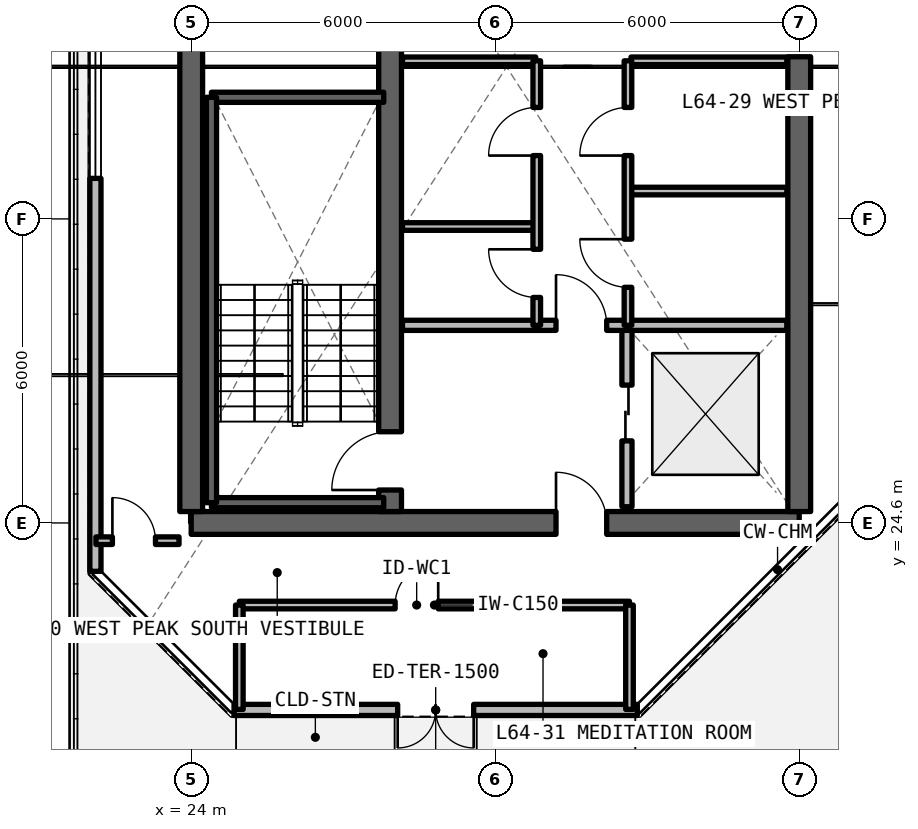
"""IFC4 building model, lengths in metres.
Left out: names, types, materials, properties, quantities, classifications, styles, units other than length and angle.
Written with IfcOpenShell. Run it as: python <this file> out.ifc"""

import sys

from ifc_helpers import new_model, si_unit, direction, frame, frame_2d, origin, place, context, subcontext, project, spatial, rectangle, extrude, element, fill, save


model = new_model("IFC4")
c1 = context("Model", 3, precision=1e-05, world=origin(), true_north=direction((0.0, 1.0)))
c2 = subcontext(c1, "Body", "Model", "MODEL_VIEW")
j1 = project(units=[si_unit("LENGTHUNIT", "METRE"), si_unit("PLANEANGLEUNIT", "RADIAN")], contexts=[c1])
p1 = place(None, origin())
s1 = spatial("IfcSite", under=j1, at=p1, CompositionType="ELEMENT")
p2 = place(p1, origin())
s2 = spatial("IfcBuilding", under=s1, at=p2, CompositionType="ELEMENT")
p3 = place(p2, frame((0.0, 0.0, 229.35)))
s3 = spatial("IfcBuildingStorey", under=s2, at=p3, CompositionType="ELEMENT", Elevation=229.35)
p4 = place(p3, frame((24.0, 24.6, 0.0), z_axis=(0.0, 0.0, 1.0), x_axis=(1.0, 0.0, 0.0)))
e1 = element("IfcWall", 1, at=p4, inside=s3, PredefinedType="SHEAR", context=c2, shape_type="SweptSolid", body=[
    extrude(rectangle(XDim=12.0, YDim=0.45, at=frame_2d((6.0, 0.0))), origin(), (0.0, 0.0, 1.0), 3.3),
])
p5 = place(p4, frame((7.2, 0.0, 0.0)))
e2 = element("IfcOpeningElement", 2, at=p5, cuts=e1, PredefinedType="OPENING", context=c2, shape_type="SweptSolid", body=[
    extrude(rectangle(XDim=1.0, YDim=2.15, at=frame_2d((0.5, 1.075))), frame((0.0, 0.235, 0.0), z_axis=(0.0, -1.0, 0.0), x_axis=(1.0, 0.0, 0.0)), (0.0, 0.0, 1.0), 0.47),
])
p6 = place(p3, frame((24.0, 24.825, 0.0), z_axis=(0.0, 0.0, 1.0), x_axis=(0.0, 1.0, 0.0)))
e3 = element("IfcWall", 3, at=p6, inside=s3, PredefinedType="SHEAR", context=c2, shape_type="SweptSolid", body=[
    extrude(rectangle(XDim=17.55, YDim=0.45, at=frame_2d((8.775, 0.0))), origin(), (0.0, 0.0, 1.0), 3.3),
])
p7 = place(p3, frame((36.0, 24.825, 0.0), z_axis=(0.0, 0.0, 1.0), x_axis=(0.0, 1.0, 0.0)))
e4 = element("IfcWall", 4, at=p7, inside=s3, PredefinedType="SHEAR", context=c2, shape_type="SweptSolid", body=[
    extrude(rectangle(XDim=8.975, YDim=0.45, at=frame_2d((4.488, 0.0))), origin(), (0.0, 0.0, 1.0), 3.3),
])
p8 = place(p3, frame((27.925, 24.825, 0.0), z_axis=(0.0, 0.0, 1.0), x_axis=(0.0, 1.0, 0.0)))
e5 = element("IfcWall", 5, at=p8, inside=s3, PredefinedType="SHEAR", context=c2, shape_type="SweptSolid", body=[
    extrude(rectangle(XDim=17.55, YDim=0.45, at=frame_2d((8.775, 0.0))), origin(), (0.0, 0.0, 1.0), 3.3),
])
p9 = place(p8, frame((0.425, 0.0, 0.0)))
e6 = element("IfcOpeningElement", 6, at=p9, cuts=e5, PredefinedType="OPENING", context=c2, shape_type="SweptSolid", body=[
    extrude(rectangle(XDim=1.15, YDim=2.15, at=frame_2d((0.575, 1.075))), frame((0.0, 0.235, 0.0), z_axis=(0.0, -1.0, 0.0), x_axis=(1.0, 0.0, 0.0)), (0.0, 0.0, 1.0), 0.47),
])
p10 = place(p8, frame((9.625, 0.0, 0.0)))
e7 = element("IfcOpeningElement", 7, at=p10, cuts=e5, PredefinedType="OPENING", context=c2, shape_type="SweptSolid", body=[
    extrude(rectangle(XDim=1.15, YDim=2.15, at=frame_2d((0.575, 1.075))), frame((0.0, 0.235, 0.0), z_axis=(0.0, -1.0, 0.0), x_axis=(1.0, 0.0, 0.0)), (0.0, 0.0, 1.0), 0.47),
])
p11 = place(p3, frame((24.846, 20.91, 0.0), z_axis=(0.0, 0.0, 1.0), x_axis=(1.0, 0.0, 0.0)))
e8 = element("IfcWall", 8, at=p11, inside=s3, PredefinedType="SOLIDWALL", context=c2, shape_type="SweptSolid", body=[
    extrude(rectangle(XDim=7.959, YDim=0.22, at=frame_2d((3.979, 0.0))), origin(), (0.0, 0.0, 1.0), 3.08),
])
p12 = place(p11, frame((3.229, 0.0, 0.0)))
e9 = element("IfcOpeningElement", 9, at=p12, cuts=e8, PredefinedType="OPENING", context=c2, shape_type="SweptSolid", body=[
    extrude(rectangle(XDim=1.5, YDim=2.2, at=frame_2d((0.75, 1.1))), frame((0.0, 0.12, 0.0), z_axis=(0.0, -1.0, 0.0), x_axis=(1.0, 0.0, 0.0)), (0.0, 0.0, 1.0), 0.24),
])
p13 = place(p3, frame((22.11, 43.554, 0.0), z_axis=(0.0, 0.0, 1.0), x_axis=(0.0, -1.0, 0.0)))
e10 = element("IfcWall", 10, at=p13, inside=s3, PredefinedType="SOLIDWALL", context=c2, shape_type="SweptSolid", body=[
    extrude(rectangle(XDim=19.909, YDim=0.22, at=frame_2d((9.955, 0.0))), origin(), (0.0, 0.0, 1.0), 3.08),
])
p14 = place(p13, frame((7.754, 0.0, 0.78)))
e11 = element("IfcOpeningElement", 11, at=p14, cuts=e10, PredefinedType="OPENING", context=c2, shape_type="SweptSolid", body=[
    extrude(rectangle(XDim=4.4, YDim=1.66, at=frame_2d((2.2, 0.83))), frame((0.0, 0.12, 0.0), z_axis=(0.0, -1.0, 0.0), x_axis=(1.0, 0.0, 0.0)), (0.0, 0.0, 1.0), 0.24),
])
p15 = place(p3, frame((32.6, 24.92, 0.0), z_axis=(0.0, 0.0, 1.0), x_axis=(0.0, 1.0, 0.0)))
e12 = element("IfcWall", 12, at=p15, inside=s3, PredefinedType="SOLIDWALL", context=c2, shape_type="SweptSolid", body=[
    extrude(rectangle(XDim=3.58, YDim=0.2, at=frame_2d((1.79, 0.0))), origin(), (0.0, 0.0, 1.0), 2.35),
])
p16 = place(p15, frame((1.3, 0.0, 0.0)))
e13 = element("IfcOpeningElement", 13, at=p16, cuts=e12, PredefinedType="OPENING", context=c2, shape_type="SweptSolid", body=[
    extrude(rectangle(XDim=1.1, YDim=2.2, at=frame_2d((0.55, 1.1))), frame((0.0, 0.11, 0.0), z_axis=(0.0, -1.0, 0.0), x_axis=(1.0, 0.0, 0.0)), (0.0, 0.0, 1.0), 0.22),
])
p17 = place(p3, frame((28.17, 28.5, 0.0), z_axis=(0.0, 0.0, 1.0), x_axis=(1.0, 0.0, 0.0)))
e14 = element("IfcWall", 14, at=p17, inside=s3, PredefinedType="SOLIDWALL", context=c2, shape_type="SweptSolid", body=[
    extrude(rectangle(XDim=7.585, YDim=0.2, at=frame_2d((3.792, 0.0))), origin(), (0.0, 0.0, 1.0), 2.35),
])
p18 = place(p17, frame((3.03, 0.0, 0.0)))
e15 = element("IfcOpeningElement", 15, at=p18, cuts=e14, PredefinedType="OPENING", context=c2, shape_type="SweptSolid", body=[
    extrude(rectangle(XDim=1.0, YDim=2.15, at=frame_2d((0.5, 1.075))), frame((0.0, 0.11, 0.0), z_axis=(0.0, -1.0, 0.0), x_axis=(1.0, 0.0, 0.0)), (0.0, 0.0, 1.0), 0.22),
])
for number, where, z_axis, x_axis in (
    (16, (28.17, 30.45, 0.0), (0.0, 0.0, 1.0), (1.0, 0.0, 0.0)),
    (17, (28.17, 33.72, 0.0), (0.0, 0.0, 1.0), (1.0, 0.0, 0.0)),
):
    element("IfcWall", number, at=place(p3, frame(where, z_axis=z_axis, x_axis=x_axis)), inside=s3, PredefinedType="SOLIDWALL", context=c2, shape_type="SweptSolid", body=[
        extrude(rectangle(XDim=2.63, YDim=0.15, at=frame_2d((1.315, 0.0))), origin(), (0.0, 0.0, 1.0), 2.35),
    ])
p19 = place(p3, frame((30.82, 28.5, 0.0), z_axis=(0.0, 0.0, 1.0), x_axis=(0.0, 1.0, 0.0)))
e18 = element("IfcWall", 18, at=p19, inside=s3, PredefinedType="SOLIDWALL", context=c2, shape_type="SweptSolid", body=[
    extrude(rectangle(XDim=5.22, YDim=0.15, at=frame_2d((2.61, 0.0))), origin(), (0.0, 0.0, 1.0), 2.35),
])
p20 = place(p19, frame((0.55, 0.0, 0.0)))
e19 = element("IfcOpeningElement", 19, at=p20, cuts=e18, PredefinedType="OPENING", context=c2, shape_type="SweptSolid", body=[
    extrude(rectangle(XDim=0.95, YDim=2.15, at=frame_2d((0.475, 1.075))), frame((0.0, 0.085, 0.0), z_axis=(0.0, -1.0, 0.0), x_axis=(1.0, 0.0, 0.0)), (0.0, 0.0, 1.0), 0.17),
])
p21 = place(p19, frame((3.35, 0.0, 0.0)))
e20 = element("IfcOpeningElement", 20, at=p21, cuts=e18, PredefinedType="OPENING", context=c2, shape_type="SweptSolid", body=[
    extrude(rectangle(XDim=0.95, YDim=2.15, at=frame_2d((0.475, 1.075))), frame((0.0, 0.085, 0.0), z_axis=(0.0, -1.0, 0.0), x_axis=(1.0, 0.0, 0.0)), (0.0, 0.0, 1.0), 0.17),
])
for number, where, z_axis, x_axis in (
    (21, (32.68, 31.15, 0.0), (0.0, 0.0, 1.0), (1.0, 0.0, 0.0)),
    (22, (32.68, 33.72, 0.0), (0.0, 0.0, 1.0), (1.0, 0.0, 0.0)),
):
    element("IfcWall", number, at=place(p3, frame(where, z_axis=z_axis, x_axis=x_axis)), inside=s3, PredefinedType="SOLIDWALL", context=c2, shape_type="SweptSolid", body=[
        extrude(rectangle(XDim=3.075, YDim=0.15, at=frame_2d((1.538, 0.0))), origin(), (0.0, 0.0, 1.0), 2.35),
    ])
p22 = place(p3, frame((32.62, 28.5, 0.0), z_axis=(0.0, 0.0, 1.0), x_axis=(0.0, 1.0, 0.0)))
e23 = element("IfcWall", 23, at=p22, inside=s3, PredefinedType="SOLIDWALL", context=c2, shape_type="SweptSolid", body=[
    extrude(rectangle(XDim=5.22, YDim=0.15, at=frame_2d((2.61, 0.0))), origin(), (0.0, 0.0, 1.0), 2.35),
])
p23 = place(p22, frame((0.75, 0.0, 0.0)))
e24 = element("IfcOpeningElement", 24, at=p23, cuts=e23, PredefinedType="OPENING", context=c2, shape_type="SweptSolid", body=[
    extrude(rectangle(XDim=0.95, YDim=2.15, at=frame_2d((0.475, 1.075))), frame((0.0, 0.085, 0.0), z_axis=(0.0, -1.0, 0.0), x_axis=(1.0, 0.0, 0.0)), (0.0, 0.0, 1.0), 0.17),
])
p24 = place(p22, frame((3.35, 0.0, 0.0)))
e25 = element("IfcOpeningElement", 25, at=p24, cuts=e23, PredefinedType="OPENING", context=c2, shape_type="SweptSolid", body=[
    extrude(rectangle(XDim=0.95, YDim=2.15, at=frame_2d((0.475, 1.075))), frame((0.0, 0.085, 0.0), z_axis=(0.0, -1.0, 0.0), x_axis=(1.0, 0.0, 0.0)), (0.0, 0.0, 1.0), 0.17),
])
p25 = place(p3, frame((24.95, 22.98, 0.0), z_axis=(0.0, 0.0, 1.0), x_axis=(1.0, 0.0, 0.0)))
e26 = element("IfcWall", 26, at=p25, inside=s3, PredefinedType="SOLIDWALL", context=c2, shape_type="SweptSolid", body=[
    extrude(rectangle(XDim=7.7, YDim=0.15, at=frame_2d((3.85, 0.0))), origin(), (0.0, 0.0, 1.0), 2.35),
])
p26 = place(p25, frame((3.075, 0.0, 0.0)))
e27 = element("IfcOpeningElement", 27, at=p26, cuts=e26, PredefinedType="OPENING", context=c2, shape_type="SweptSolid", body=[
    extrude(rectangle(XDim=0.85, YDim=2.1, at=frame_2d((0.425, 1.05))), frame((0.0, 0.085, 0.0), z_axis=(0.0, -1.0, 0.0), x_axis=(1.0, 0.0, 0.0)), (0.0, 0.0, 1.0), 0.17),
])
for number, where, z_axis, x_axis in (
    (28, (24.95, 20.92, 0.0), (0.0, 0.0, 1.0), (0.0, 1.0, 0.0)),
    (29, (32.65, 20.92, 0.0), (0.0, 0.0, 1.0), (0.0, 1.0, 0.0)),
):
    element("IfcWall", number, at=place(p3, frame(where, z_axis=z_axis, x_axis=x_axis)), inside=s3, PredefinedType="SOLIDWALL", context=c2, shape_type="SweptSolid", body=[
        extrude(rectangle(XDim=2.06, YDim=0.15, at=frame_2d((1.03, 0.0))), origin(), (0.0, 0.0, 1.0), 2.35),
    ])
p27 = place(p3, frame((22.12, 24.25, 0.0), z_axis=(0.0, 0.0, 1.0), x_axis=(1.0, 0.0, 0.0)))
e30 = element("IfcWall", 30, at=p27, inside=s3, PredefinedType="SOLIDWALL", context=c2, shape_type="SweptSolid", body=[
    extrude(rectangle(XDim=1.64, YDim=0.15, at=frame_2d((0.82, 0.0))), origin(), (0.0, 0.0, 1.0), 2.35),
])
p28 = place(p27, frame((0.325, 0.0, 0.0)))
e31 = element("IfcOpeningElement", 31, at=p28, cuts=e30, PredefinedType="OPENING", context=c2, shape_type="SweptSolid", body=[
    extrude(rectangle(XDim=0.85, YDim=2.1, at=frame_2d((0.425, 1.05))), frame((0.0, 0.085, 0.0), z_axis=(0.0, -1.0, 0.0), x_axis=(1.0, 0.0, 0.0)), (0.0, 0.0, 1.0), 0.17),
])
for number, where, z_axis, x_axis in (
    (32, (24.4, 25.0, 0.0), (0.0, 0.0, 1.0), (1.0, 0.0, 0.0)),
    (33, (27.8, 33.0, 0.0), (0.0, 0.0, 1.0), (-1.0, 0.0, 0.0)),
):
    element("IfcWall", number, at=place(p3, frame(where, z_axis=z_axis, x_axis=x_axis)), inside=s3, PredefinedType="SOLIDWALL", context=c2, shape_type="SweptSolid", body=[
        extrude(rectangle(XDim=3.4, YDim=0.2, at=frame_2d((1.7, 0.0))), origin(), (0.0, 0.0, 1.0), 3.3),
    ])
p29 = place(p3, frame((24.4, 33.0, 0.0), z_axis=(0.0, 0.0, 1.0), x_axis=(0.0, -1.0, 0.0)))
e34 = element("IfcWall", 34, at=p29, inside=s3, PredefinedType="SOLIDWALL", context=c2, shape_type="SweptSolid", body=[
    extrude(rectangle(XDim=8.0, YDim=0.2, at=frame_2d((4.0, 0.0))), origin(), (0.0, 0.0, 1.0), 3.3),
])
p30 = place(p12, frame((1.5, 0.0, 0.0), z_axis=(0.0, 0.0, 1.0), x_axis=(-1.0, 0.0, 0.0)))
e35 = element("IfcDoor", 35, at=p30, inside=s3, OperationType="SINGLE_SWING_LEFT", PredefinedType="DOOR", context=c2, shape_type="SweptSolid", body=[
    extrude(rectangle(XDim=1.5, YDim=2.2, at=frame_2d((0.75, 1.1))), frame((0.0, 0.025, 0.0), z_axis=(0.0, -1.0, 0.0), x_axis=(1.0, 0.0, 0.0)), (0.0, 0.0, 1.0), 0.05),
])
fill(e9, e35)
p31 = place(p14, origin())
e36 = element("IfcWindow", 36, at=p31, inside=s3, PartitioningType="SINGLE_PANEL", PredefinedType="WINDOW", context=c2, shape_type="SweptSolid", body=[
    extrude(rectangle(XDim=4.4, YDim=1.66, at=frame_2d((2.2, 0.83))), frame((0.0, 0.03, 0.0), z_axis=(0.0, -1.0, 0.0), x_axis=(1.0, 0.0, 0.0)), (0.0, 0.0, 1.0), 0.06),
])
fill(e11, e36)
p32 = place(p16, origin())
e37 = element("IfcDoor", 37, at=p32, inside=s3, OperationType="SLIDING_TO_LEFT", PredefinedType="DOOR", context=c2, shape_type="SweptSolid", body=[
    extrude(rectangle(XDim=1.1, YDim=2.2, at=frame_2d((0.55, 1.1))), frame((0.0, 0.025, 0.0), z_axis=(0.0, -1.0, 0.0), x_axis=(1.0, 0.0, 0.0)), (0.0, 0.0, 1.0), 0.05),
])
fill(e13, e37)
p33 = place(p18, origin())
e38 = element("IfcDoor", 38, at=p33, inside=s3, OperationType="SINGLE_SWING_LEFT", PredefinedType="DOOR", context=c2, shape_type="SweptSolid", body=[
    extrude(rectangle(XDim=1.0, YDim=2.15, at=frame_2d((0.5, 1.075))), frame((0.0, 0.025, 0.0), z_axis=(0.0, -1.0, 0.0), x_axis=(1.0, 0.0, 0.0)), (0.0, 0.0, 1.0), 0.05),
])
fill(e15, e38)
p34 = place(p20, origin())
e39 = element("IfcDoor", 39, at=p34, inside=s3, OperationType="SINGLE_SWING_RIGHT", PredefinedType="DOOR", context=c2, shape_type="SweptSolid", body=[
    extrude(rectangle(XDim=0.95, YDim=2.15, at=frame_2d((0.475, 1.075))), frame((0.0, 0.025, 0.0), z_axis=(0.0, -1.0, 0.0), x_axis=(1.0, 0.0, 0.0)), (0.0, 0.0, 1.0), 0.05),
])
fill(e19, e39)
p35 = place(p21, origin())
e40 = element("IfcDoor", 40, at=p35, inside=s3, OperationType="SINGLE_SWING_LEFT", PredefinedType="DOOR", context=c2, shape_type="SweptSolid", body=[
    extrude(rectangle(XDim=0.95, YDim=2.15, at=frame_2d((0.475, 1.075))), frame((0.0, 0.025, 0.0), z_axis=(0.0, -1.0, 0.0), x_axis=(1.0, 0.0, 0.0)), (0.0, 0.0, 1.0), 0.05),
])
fill(e20, e40)
p36 = place(p23, origin())
e41 = element("IfcDoor", 41, at=p36, inside=s3, OperationType="SINGLE_SWING_RIGHT", PredefinedType="DOOR", context=c2, shape_type="SweptSolid", body=[
    extrude(rectangle(XDim=0.95, YDim=2.15, at=frame_2d((0.475, 1.075))), frame((0.0, 0.025, 0.0), z_axis=(0.0, -1.0, 0.0), x_axis=(1.0, 0.0, 0.0)), (0.0, 0.0, 1.0), 0.05),
])
fill(e24, e41)
p37 = place(p24, origin())
e42 = element("IfcDoor", 42, at=p37, inside=s3, OperationType="SINGLE_SWING_LEFT", PredefinedType="DOOR", context=c2, shape_type="SweptSolid", body=[
    extrude(rectangle(XDim=0.95, YDim=2.15, at=frame_2d((0.475, 1.075))), frame((0.0, 0.025, 0.0), z_axis=(0.0, -1.0, 0.0), x_axis=(1.0, 0.0, 0.0)), (0.0, 0.0, 1.0), 0.05),
])
fill(e25, e42)
p38 = place(p26, origin())
e43 = element("IfcDoor", 43, at=p38, inside=s3, OperationType="SINGLE_SWING_RIGHT", PredefinedType="DOOR", context=c2, shape_type="SweptSolid", body=[
    extrude(rectangle(XDim=0.85, YDim=2.1, at=frame_2d((0.425, 1.05))), frame((0.0, 0.025, 0.0), z_axis=(0.0, -1.0, 0.0), x_axis=(1.0, 0.0, 0.0)), (0.0, 0.0, 1.0), 0.05),
])
fill(e27, e43)
p39 = place(p28, origin())
e44 = element("IfcDoor", 44, at=p39, inside=s3, OperationType="SINGLE_SWING_LEFT", PredefinedType="DOOR", context=c2, shape_type="SweptSolid", body=[
    extrude(rectangle(XDim=0.85, YDim=2.1, at=frame_2d((0.425, 1.05))), frame((0.0, 0.025, 0.0), z_axis=(0.0, -1.0, 0.0), x_axis=(1.0, 0.0, 0.0)), (0.0, 0.0, 1.0), 0.05),
])
fill(e31, e44)
p40 = place(p9, origin())
e45 = element("IfcDoor", 45, at=p40, inside=s3, OperationType="SINGLE_SWING_LEFT", PredefinedType="DOOR", context=c2, shape_type="SweptSolid", body=[
    extrude(rectangle(XDim=1.15, YDim=2.15, at=frame_2d((0.575, 1.075))), frame((0.0, 0.025, 0.0), z_axis=(0.0, -1.0, 0.0), x_axis=(1.0, 0.0, 0.0)), (0.0, 0.0, 1.0), 0.05),
])
fill(e6, e45)
p41 = place(p5, origin())
e46 = element("IfcDoor", 46, at=p41, inside=s3, OperationType="SINGLE_SWING_LEFT", PredefinedType="DOOR", context=c2, shape_type="SweptSolid", body=[
    extrude(rectangle(XDim=1.0, YDim=2.15, at=frame_2d((0.5, 1.075))), frame((0.0, 0.025, 0.0), z_axis=(0.0, -1.0, 0.0), x_axis=(1.0, 0.0, 0.0)), (0.0, 0.0, 1.0), 0.05),
])
fill(e2, e46)
save(model, sys.argv[1])
